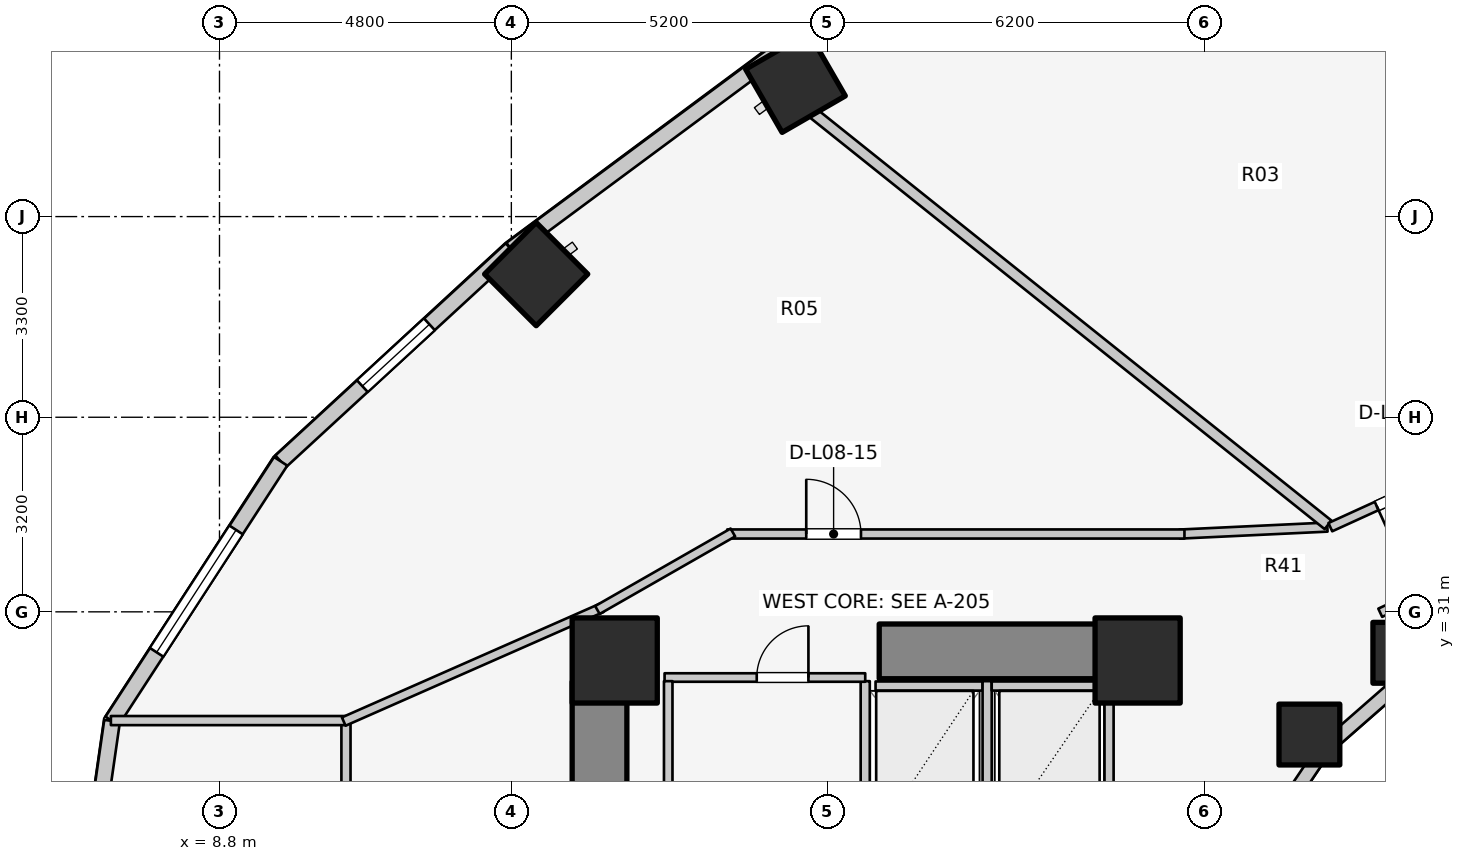
"""IFC4 building model, lengths in metres.
Left out: names, types, materials, properties, quantities, classifications, styles, units other than length and angle.
Written with IfcOpenShell. Run it as: python <this file> out.ifc"""

import sys

from ifc_helpers import new_model, si_unit, direction, frame, frame_2d, origin, origin_2d, place, context, subcontext, project, spatial, rectangle, extrude, element, fill, save


model = new_model("IFC4")
c1 = context("Model", 3, precision=1e-05, world=origin(), true_north=direction((0.0, 1.0)))
c2 = subcontext(c1, "Body", "Model", "MODEL_VIEW")
j1 = project(units=[si_unit("LENGTHUNIT", "METRE"), si_unit("PLANEANGLEUNIT", "RADIAN")], contexts=[c1])
p1 = place(None, origin())
s1 = spatial("IfcSite", under=j1, at=p1, CompositionType="ELEMENT")
p2 = place(p1, origin())
s2 = spatial("IfcBuilding", under=s1, at=p2, CompositionType="ELEMENT")
p3 = place(p2, frame((0.0, 0.0, 30.7)))
s3 = spatial("IfcBuildingStorey", under=s2, at=p3, CompositionType="ELEMENT", Elevation=30.7)
p4 = place(p3, frame((15.05, 17.05, 0.0), z_axis=(0.0, 0.0, 1.0), x_axis=(0.0, 1.0, 0.0)))
e1 = element("IfcWall", 1, at=p4, inside=s3, PredefinedType="SHEAR", context=c2, shape_type="SweptSolid", body=[
    extrude(rectangle(XDim=12.8, YDim=0.9, at=frame_2d((6.4, 0.0))), origin(), (0.0, 0.0, 1.0), 3.1),
])
p5 = place(p3, frame((19.65, 30.35, 0.0), z_axis=(0.0, 0.0, 1.0), x_axis=(1.0, 0.0, 0.0)))
e2 = element("IfcWall", 2, at=p5, inside=s3, PredefinedType="SHEAR", context=c2, shape_type="SweptSolid", body=[
    extrude(rectangle(XDim=4.5, YDim=0.9, at=frame_2d((2.25, 0.0))), origin(), (0.0, 0.0, 1.0), 3.1),
])
for number, where, z_axis, x_axis in (
    (3, (23.9, 30.2, 0.0), (0.0, 0.0, 1.0), (1.0, 0.0, 0.0)),
    (4, (15.3, 30.2, 0.0), (0.0, 0.0, 1.0), (1.0, 0.0, 0.0)),
):
    element("IfcColumn", number, at=place(p3, frame(where, z_axis=z_axis, x_axis=x_axis)), inside=s3, PredefinedType="COLUMN", context=c2, shape_type="SweptSolid", body=[
        extrude(rectangle(XDim=1.4, YDim=1.4, at=origin_2d()), origin(), (0.0, 0.0, 1.0), 3.1),
    ])
p6 = place(p3, frame((28.27, 30.327, 0.0), z_axis=(0.0, 0.0, 1.0), x_axis=(1.0, 0.0, 0.0)))
e5 = element("IfcColumn", 5, at=p6, inside=s3, PredefinedType="COLUMN", context=c2, shape_type="SweptSolid", body=[
    extrude(rectangle(XDim=1.0, YDim=1.0, at=origin_2d()), origin(), (0.0, 0.0, 1.0), 3.1),
])
p7 = place(p3, frame((18.273, 39.704, 0.0), z_axis=(0.0, 0.0, 1.0), x_axis=(-0.5, 0.866025403784, 0.0)))
e6 = element("IfcColumn", 6, at=p7, inside=s3, PredefinedType="COLUMN", context=c2, shape_type="SweptSolid", body=[
    extrude(rectangle(XDim=1.2, YDim=1.2, at=origin_2d()), origin(), (0.0, 0.0, 1.0), 3.1),
])
p8 = place(p3, frame((26.725, 28.982, 0.0), z_axis=(0.0, 0.0, 1.0), x_axis=(1.0, 0.0, 0.0)))
e7 = element("IfcColumn", 7, at=p8, inside=s3, PredefinedType="COLUMN", context=c2, shape_type="SweptSolid", body=[
    extrude(rectangle(XDim=1.0, YDim=1.0, at=origin_2d()), origin(), (0.0, 0.0, 1.0), 3.1),
])
p9 = place(p3, frame((14.008, 36.554, 0.0), z_axis=(0.0, 0.0, 1.0), x_axis=(-0.707106781187, 0.707106781187, 0.0)))
e8 = element("IfcColumn", 8, at=p9, inside=s3, PredefinedType="COLUMN", context=c2, shape_type="SweptSolid", body=[
    extrude(rectangle(XDim=1.2, YDim=1.2, at=origin_2d()), origin(), (0.0, 0.0, 1.0), 3.1),
])
p10 = place(p3, frame((28.44, 30.032, 0.0), z_axis=(0.0, 0.0, 1.0), x_axis=(-0.752576694707, -0.658504607869, 0.0)))
e9 = element("IfcWall", 9, at=p10, inside=s3, PredefinedType="STANDARD", context=c2, shape_type="SweptSolid", body=[
    extrude(rectangle(XDim=1.959, YDim=0.23, at=frame_2d((0.98, 0.0))), origin(), (0.0, 0.0, 1.0), 2.16),
])
p11 = place(p3, frame((26.965, 28.742, 0.0), z_axis=(0.0, 0.0, 1.0), x_axis=(-0.558197800898, -0.829707909492, 0.0)))
e10 = element("IfcWall", 10, at=p11, inside=s3, PredefinedType="STANDARD", context=c2, shape_type="SweptSolid", body=[
    extrude(rectangle(XDim=2.027, YDim=0.23, at=frame_2d((1.013, 0.0))), origin(), (0.0, 0.0, 1.0), 2.16),
])
p12 = place(p3, frame((23.668, 42.636, 0.0), z_axis=(0.0, 0.0, 1.0), x_axis=(-0.919612132394, -0.39282760335, 0.0)))
e11 = element("IfcWall", 11, at=p12, inside=s3, PredefinedType="STANDARD", context=c2, shape_type="SweptSolid", body=[
    extrude(rectangle(XDim=6.209, YDim=0.26, at=frame_2d((3.105, 0.0))), origin(), (0.0, 0.0, 1.0), 2.88),
])
p13 = place(p12, frame((2.505, 0.0, 0.0)))
e12 = element("IfcOpeningElement", 12, at=p13, cuts=e11, PredefinedType="OPENING", context=c2, shape_type="SweptSolid", body=[
    extrude(rectangle(XDim=1.2, YDim=2.2, at=frame_2d((0.6, 1.1))), frame((0.0, 0.14, 0.0), z_axis=(0.0, -1.0, 0.0), x_axis=(1.0, 0.0, 0.0)), (0.0, 0.0, 1.0), 0.28),
])
p14 = place(p3, frame((17.958, 40.197, 0.0), z_axis=(0.0, 0.0, 1.0), x_axis=(-0.803477531792, -0.595335078679, 0.0)))
e13 = element("IfcWall", 13, at=p14, inside=s3, PredefinedType="STANDARD", context=c2, shape_type="SweptSolid", body=[
    extrude(rectangle(XDim=5.43, YDim=0.26, at=frame_2d((2.715, 0.0))), origin(), (0.0, 0.0, 1.0), 2.85),
])
p15 = place(p3, frame((13.595, 36.965, 0.0), z_axis=(0.0, 0.0, 1.0), x_axis=(-0.735655109293, -0.67735630223, 0.0)))
e14 = element("IfcWall", 14, at=p15, inside=s3, PredefinedType="STANDARD", context=c2, shape_type="SweptSolid", body=[
    extrude(rectangle(XDim=5.151, YDim=0.26, at=frame_2d((2.575, 0.0))), origin(), (0.0, 0.0, 1.0), 2.85),
])
p16 = place(p15, frame((1.825, 0.0, 0.75)))
e15 = element("IfcOpeningElement", 15, at=p16, cuts=e14, PredefinedType="OPENING", context=c2, shape_type="SweptSolid", body=[
    extrude(rectangle(XDim=1.5, YDim=1.6, at=frame_2d((0.75, 0.8))), frame((0.0, 0.14, 0.0), z_axis=(0.0, -1.0, 0.0), x_axis=(1.0, 0.0, 0.0)), (0.0, 0.0, 1.0), 0.28),
])
p17 = place(p3, frame((9.806, 33.476, 0.0), z_axis=(0.0, 0.0, 1.0), x_axis=(-0.544578722263, -0.838709732421, 0.0)))
e16 = element("IfcWall", 16, at=p17, inside=s3, PredefinedType="STANDARD", context=c2, shape_type="SweptSolid", body=[
    extrude(rectangle(XDim=5.092, YDim=0.26, at=frame_2d((2.546, 0.0))), origin(), (0.0, 0.0, 1.0), 2.85),
])
p18 = place(p17, frame((1.346, 0.0, 0.75)))
e17 = element("IfcOpeningElement", 17, at=p18, cuts=e16, PredefinedType="OPENING", context=c2, shape_type="SweptSolid", body=[
    extrude(rectangle(XDim=2.4, YDim=1.7, at=frame_2d((1.2, 0.85))), frame((0.0, 0.14, 0.0), z_axis=(0.0, -1.0, 0.0), x_axis=(1.0, 0.0, 0.0)), (0.0, 0.0, 1.0), 0.28),
])
p19 = place(p3, frame((7.033, 29.205, 0.0), z_axis=(0.0, 0.0, 1.0), x_axis=(-0.142528001686, -0.989790770181, 0.0)))
e18 = element("IfcWall", 18, at=p19, inside=s3, PredefinedType="STANDARD", context=c2, shape_type="SweptSolid", body=[
    extrude(rectangle(XDim=6.269, YDim=0.26, at=frame_2d((3.135, 0.0))), origin(), (0.0, 0.0, 1.0), 2.85),
])
p20 = place(p19, frame((2.385, 0.0, 0.75)))
e19 = element("IfcOpeningElement", 19, at=p20, cuts=e18, PredefinedType="OPENING", context=c2, shape_type="SweptSolid", body=[
    extrude(rectangle(XDim=1.5, YDim=1.6, at=frame_2d((0.75, 0.8))), frame((0.0, 0.14, 0.0), z_axis=(0.0, -1.0, 0.0), x_axis=(1.0, 0.0, 0.0)), (0.0, 0.0, 1.0), 0.28),
])
p21 = place(p3, frame((19.59, 29.78, 0.0), z_axis=(0.0, 0.0, 1.0), x_axis=(1.0, 0.0, 0.0)))
e20 = element("IfcWall", 20, at=p21, inside=s3, PredefinedType="SOLIDWALL", context=c2, shape_type="SweptSolid", body=[
    extrude(rectangle(XDim=1.76, YDim=0.15, at=frame_2d((0.88, 0.0))), origin(), (0.0, 0.0, 1.0), 2.855),
])
for number, where, z_axis, x_axis in (
    (21, (19.42, 27.14, 0.0), (0.0, 0.0, 1.0), (0.0, 1.0, 0.0)),
    (22, (21.425, 27.14, 0.0), (0.0, 0.0, 1.0), (0.0, 1.0, 0.0)),
):
    element("IfcWall", number, at=place(p3, frame(where, z_axis=z_axis, x_axis=x_axis)), inside=s3, PredefinedType="SOLIDWALL", context=c2, shape_type="SweptSolid", body=[
        extrude(rectangle(XDim=2.72, YDim=0.15, at=frame_2d((1.36, 0.0))), origin(), (0.0, 0.0, 1.0), 2.855),
    ])
p22 = place(p3, frame((21.5, 29.78, 0.0), z_axis=(0.0, 0.0, 1.0), x_axis=(1.0, 0.0, 0.0)))
e23 = element("IfcWall", 23, at=p22, inside=s3, PredefinedType="SOLIDWALL", context=c2, shape_type="SweptSolid", body=[
    extrude(rectangle(XDim=1.76, YDim=0.15, at=frame_2d((0.88, 0.0))), origin(), (0.0, 0.0, 1.0), 2.855),
])
p23 = place(p3, frame((23.43, 27.14, 0.0), z_axis=(0.0, 0.0, 1.0), x_axis=(0.0, 1.0, 0.0)))
e24 = element("IfcWall", 24, at=p23, inside=s3, PredefinedType="SOLIDWALL", context=c2, shape_type="SweptSolid", body=[
    extrude(rectangle(XDim=2.72, YDim=0.15, at=frame_2d((1.36, 0.0))), origin(), (0.0, 0.0, 1.0), 2.855),
])
p24 = place(p3, frame((16.12, 29.92, 0.0), z_axis=(0.0, 0.0, 1.0), x_axis=(1.0, 0.0, 0.0)))
e25 = element("IfcWall", 25, at=p24, inside=s3, PredefinedType="PLUMBINGWALL", context=c2, shape_type="SweptSolid", body=[
    extrude(rectangle(XDim=3.3, YDim=0.14, at=frame_2d((1.65, 0.0))), origin(), (0.0, 0.0, 1.0), 2.855),
])
p25 = place(p24, frame((1.516, 0.0, 0.0)))
e26 = element("IfcOpeningElement", 26, at=p25, cuts=e25, PredefinedType="OPENING", context=c2, shape_type="SweptSolid", body=[
    extrude(rectangle(XDim=0.85, YDim=2.05, at=frame_2d((0.425, 1.025))), frame((0.0, 0.08, 0.0), z_axis=(0.0, -1.0, 0.0), x_axis=(1.0, 0.0, 0.0)), (0.0, 0.0, 1.0), 0.16),
])
p26 = place(p3, frame((16.18, 25.98, 0.0), z_axis=(0.0, 0.0, 1.0), x_axis=(0.0, 1.0, 0.0)))
e27 = element("IfcWall", 27, at=p26, inside=s3, PredefinedType="PLUMBINGWALL", context=c2, shape_type="SweptSolid", body=[
    extrude(rectangle(XDim=3.88, YDim=0.14, at=frame_2d((1.94, 0.0))), origin(), (0.0, 0.0, 1.0), 2.855),
])
p27 = place(p3, frame((29.873, 31.906, 0.0), z_axis=(0.0, 0.0, 1.0), x_axis=(-0.906943449489, -0.421252393975, 0.0)))
e28 = element("IfcWall", 28, at=p27, inside=s3, PredefinedType="PARTITIONING", context=c2, shape_type="SweptSolid", body=[
    extrude(rectangle(XDim=2.186, YDim=0.15, at=frame_2d((1.093, 0.0))), origin(), (0.0, 0.0, 1.0), 2.237),
])
p28 = place(p3, frame((10.88, 16.748, 0.0), z_axis=(0.0, 0.0, 1.0), x_axis=(0.0, 1.0, 0.0)))
e29 = element("IfcWall", 29, at=p28, inside=s3, PredefinedType="PARTITIONING", context=c2, shape_type="SweptSolid", body=[
    extrude(rectangle(XDim=12.503, YDim=0.15, at=frame_2d((6.252, 0.0))), origin(), (0.0, 0.0, 1.0), 2.12),
])
p29 = place(p3, frame((7.014, 29.212, 0.0), z_axis=(0.0, 0.0, 1.0), x_axis=(1.0, 0.0, 0.0)))
e30 = element("IfcWall", 30, at=p29, inside=s3, PredefinedType="PARTITIONING", context=c2, shape_type="SweptSolid", body=[
    extrude(rectangle(XDim=3.866, YDim=0.15, at=frame_2d((1.933, 0.0))), origin(), (0.0, 0.0, 1.0), 2.855),
])
p30 = place(p3, frame((10.844, 29.196, 0.0), z_axis=(0.0, 0.0, 1.0), x_axis=(0.91502756289, 0.403391322604, 0.0)))
e31 = element("IfcWall", 31, at=p30, inside=s3, PredefinedType="PARTITIONING", context=c2, shape_type="SweptSolid", body=[
    extrude(rectangle(XDim=4.637, YDim=0.15, at=frame_2d((2.319, 0.0))), origin(), (0.0, 0.0, 1.0), 2.069),
])
p31 = place(p3, frame((27.02, 32.394, 0.0), z_axis=(0.0, 0.0, 1.0), x_axis=(-0.998877427952, -0.047369651964, 0.0)))
e32 = element("IfcWall", 32, at=p31, inside=s3, PredefinedType="PARTITIONING", context=c2, shape_type="SweptSolid", body=[
    extrude(rectangle(XDim=2.433, YDim=0.15, at=frame_2d((1.216, 0.0))), origin(), (0.0, 0.0, 1.0), 2.237),
])
p32 = place(p3, frame((17.15, 32.28, 0.0), z_axis=(0.0, 0.0, 1.0), x_axis=(1.0, 0.0, 0.0)))
e33 = element("IfcWall", 33, at=p32, inside=s3, PredefinedType="PARTITIONING", context=c2, shape_type="SweptSolid", body=[
    extrude(rectangle(XDim=7.52, YDim=0.15, at=frame_2d((3.76, 0.0))), origin(), (0.0, 0.0, 1.0), 2.237),
])
p33 = place(p32, frame((1.3, 0.0, 0.0)))
e34 = element("IfcOpeningElement", 34, at=p33, cuts=e33, PredefinedType="OPENING", context=c2, shape_type="SweptSolid", body=[
    extrude(rectangle(XDim=0.9, YDim=2.1, at=frame_2d((0.45, 1.05))), frame((0.0, 0.085, 0.0), z_axis=(0.0, -1.0, 0.0), x_axis=(1.0, 0.0, 0.0)), (0.0, 0.0, 1.0), 0.17),
])
p34 = place(p3, frame((17.243, 32.305, 0.0), z_axis=(0.0, 0.0, 1.0), x_axis=(-0.867991349648, -0.496579315857, 0.0)))
e35 = element("IfcWall", 35, at=p34, inside=s3, PredefinedType="PARTITIONING", context=c2, shape_type="SweptSolid", body=[
    extrude(rectangle(XDim=2.567, YDim=0.15, at=frame_2d((1.283, 0.0))), origin(), (0.0, 0.0, 1.0), 2.069),
])
p35 = place(p3, frame((27.032, 32.431, 0.0), z_axis=(0.0, 0.0, 1.0), x_axis=(-0.781055486744, 0.624461629428, 0.0)))
e36 = element("IfcWall", 36, at=p35, inside=s3, PredefinedType="PARTITIONING", context=c2, shape_type="SweptSolid", body=[
    extrude(rectangle(XDim=10.843, YDim=0.18, at=frame_2d((5.422, 0.0))), origin(), (0.0, 0.0, 1.0), 2.237),
])
p36 = place(p3, frame((29.457, 33.482, 0.0), z_axis=(0.0, 0.0, 1.0), x_axis=(-0.909747571199, -0.415161843982, 0.0)))
e37 = element("IfcWall", 37, at=p36, inside=s3, PredefinedType="PARTITIONING", context=c2, shape_type="SweptSolid", body=[
    extrude(rectangle(XDim=2.625, YDim=0.15, at=frame_2d((1.312, 0.0))), origin(), (0.0, 0.0, 1.0), 2.237),
])
p37 = place(p36, frame((0.838, 0.0, 0.0)))
e38 = element("IfcOpeningElement", 38, at=p37, cuts=e37, PredefinedType="OPENING", context=c2, shape_type="SweptSolid", body=[
    extrude(rectangle(XDim=0.95, YDim=2.1, at=frame_2d((0.475, 1.05))), frame((0.0, 0.085, 0.0), z_axis=(0.0, -1.0, 0.0), x_axis=(1.0, 0.0, 0.0)), (0.0, 0.0, 1.0), 0.17),
])
p38 = place(p16, origin())
e39 = element("IfcWindow", 39, at=p38, inside=s3, PartitioningType="SINGLE_PANEL", PredefinedType="WINDOW", context=c2, shape_type="SweptSolid", body=[
    extrude(rectangle(XDim=1.5, YDim=1.6, at=frame_2d((0.75, 0.8))), frame((0.0, 0.03, 0.0), z_axis=(0.0, -1.0, 0.0), x_axis=(1.0, 0.0, 0.0)), (0.0, 0.0, 1.0), 0.06),
])
fill(e15, e39)
p39 = place(p18, origin())
e40 = element("IfcWindow", 40, at=p39, inside=s3, PartitioningType="SINGLE_PANEL", PredefinedType="WINDOW", context=c2, shape_type="SweptSolid", body=[
    extrude(rectangle(XDim=2.4, YDim=1.7, at=frame_2d((1.2, 0.85))), frame((0.0, 0.03, 0.0), z_axis=(0.0, -1.0, 0.0), x_axis=(1.0, 0.0, 0.0)), (0.0, 0.0, 1.0), 0.06),
])
fill(e17, e40)
p40 = place(p25, origin())
e41 = element("IfcDoor", 41, at=p40, inside=s3, OperationType="SINGLE_SWING_RIGHT", PredefinedType="DOOR", context=c2, shape_type="SweptSolid", body=[
    extrude(rectangle(XDim=0.85, YDim=2.05, at=frame_2d((0.425, 1.025))), frame((0.0, 0.025, 0.0), z_axis=(0.0, -1.0, 0.0), x_axis=(1.0, 0.0, 0.0)), (0.0, 0.0, 1.0), 0.05),
])
fill(e26, e41)
p41 = place(p33, origin())
e42 = element("IfcDoor", 42, at=p41, inside=s3, OperationType="SINGLE_SWING_LEFT", PredefinedType="DOOR", context=c2, shape_type="SweptSolid", body=[
    extrude(rectangle(XDim=0.9, YDim=2.1, at=frame_2d((0.45, 1.05))), frame((0.0, 0.025, 0.0), z_axis=(0.0, -1.0, 0.0), x_axis=(1.0, 0.0, 0.0)), (0.0, 0.0, 1.0), 0.05),
])
fill(e34, e42)
p42 = place(p37, origin())
e43 = element("IfcDoor", 43, at=p42, inside=s3, OperationType="SINGLE_SWING_RIGHT", PredefinedType="DOOR", context=c2, shape_type="SweptSolid", body=[
    extrude(rectangle(XDim=0.95, YDim=2.1, at=frame_2d((0.475, 1.05))), frame((0.0, 0.025, 0.0), z_axis=(0.0, -1.0, 0.0), x_axis=(1.0, 0.0, 0.0)), (0.0, 0.0, 1.0), 0.05),
])
fill(e38, e43)
save(model, sys.argv[1])
